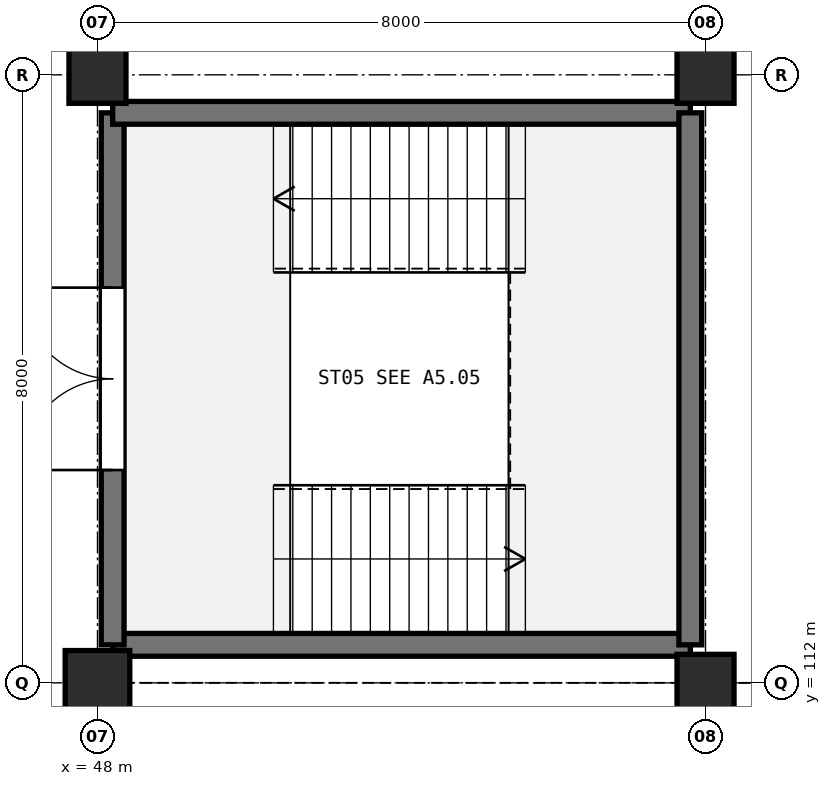
"""IFC4 building model, lengths in metres.
Left out: names, types, materials, properties, quantities, classifications, styles, units other than length and angle.
Written with IfcOpenShell. Run it as: python <this file> out.ifc"""

import sys

from ifc_helpers import new_model, si_unit, direction, frame, frame_2d, origin, origin_2d, place, context, subcontext, project, spatial, rectangle, extrude, element, fill, save


model = new_model("IFC4")
c1 = context("Model", 3, precision=1e-05, world=origin(), true_north=direction((0.0, 1.0)))
c2 = subcontext(c1, "Body", "Model", "MODEL_VIEW")
j1 = project(units=[si_unit("LENGTHUNIT", "METRE"), si_unit("PLANEANGLEUNIT", "RADIAN")], contexts=[c1])
p1 = place(None, origin())
s1 = spatial("IfcSite", under=j1, at=p1, CompositionType="ELEMENT")
p2 = place(p1, origin())
s2 = spatial("IfcBuilding", under=s1, at=p2, CompositionType="ELEMENT")
p3 = place(p2, frame((0.0, 0.0, -4.8)))
s3 = spatial("IfcBuildingStorey", under=s2, at=p3, CompositionType="ELEMENT", Elevation=-4.8)
p4 = place(p3, frame((48.0, 112.0, 0.0), z_axis=(0.0, 0.0, 1.0), x_axis=(1.0, 0.0, 0.0)))
e1 = element("IfcColumn", 1, at=p4, inside=s3, PredefinedType="COLUMN", context=c2, shape_type="SweptSolid", body=[
    extrude(rectangle(XDim=0.85, YDim=0.85, at=origin_2d()), origin(), (0.0, 0.0, 1.0), 4.8),
])
for number, where, z_axis, x_axis in (
    (2, (48.0, 120.0, 0.0), (0.0, 0.0, 1.0), (1.0, 0.0, 0.0)),
    (3, (56.0, 112.0, 0.0), (0.0, 0.0, 1.0), (1.0, 0.0, 0.0)),
    (4, (56.0, 120.0, 0.0), (0.0, 0.0, 1.0), (1.0, 0.0, 0.0)),
):
    element("IfcColumn", number, at=place(p3, frame(where, z_axis=z_axis, x_axis=x_axis)), inside=s3, PredefinedType="COLUMN", context=c2, shape_type="SweptSolid", body=[
        extrude(rectangle(XDim=0.75, YDim=0.75, at=origin_2d()), origin(), (0.0, 0.0, 1.0), 4.8),
    ])
p5 = place(p3, frame((55.8, 112.5, 0.0), z_axis=(0.0, 0.0, 1.0), x_axis=(-1.0, 0.0, 0.0)))
e5 = element("IfcWall", 5, at=p5, inside=s3, PredefinedType="SHEAR", context=c2, shape_type="SweptSolid", body=[
    extrude(rectangle(XDim=7.6, YDim=0.3, at=frame_2d((3.8, 0.0))), origin(), (0.0, 0.0, 1.0), 4.46),
])
p6 = place(p3, frame((48.2, 112.5, 0.0), z_axis=(0.0, 0.0, 1.0), x_axis=(0.0, 1.0, 0.0)))
e6 = element("IfcWall", 6, at=p6, inside=s3, PredefinedType="SHEAR", context=c2, shape_type="SweptSolid", body=[
    extrude(rectangle(XDim=7.0, YDim=0.3, at=frame_2d((3.5, 0.0))), origin(), (0.0, 0.0, 1.0), 4.46),
])
p7 = place(p6, frame((2.3, 0.0, 0.0)))
e7 = element("IfcOpeningElement", 7, at=p7, cuts=e6, PredefinedType="OPENING", context=c2, shape_type="SweptSolid", body=[
    extrude(rectangle(XDim=2.4, YDim=2.2, at=frame_2d((1.2, 1.1))), frame((0.0, 0.16, 0.0), z_axis=(0.0, -1.0, 0.0), x_axis=(1.0, 0.0, 0.0)), (0.0, 0.0, 1.0), 0.32),
])
p8 = place(p3, frame((48.2, 119.5, 0.0), z_axis=(0.0, 0.0, 1.0), x_axis=(1.0, 0.0, 0.0)))
e8 = element("IfcWall", 8, at=p8, inside=s3, PredefinedType="SHEAR", context=c2, shape_type="SweptSolid", body=[
    extrude(rectangle(XDim=7.6, YDim=0.3, at=frame_2d((3.8, 0.0))), origin(), (0.0, 0.0, 1.0), 4.46),
])
p9 = place(p3, frame((55.8, 119.5, 0.0), z_axis=(0.0, 0.0, 1.0), x_axis=(0.0, -1.0, 0.0)))
e9 = element("IfcWall", 9, at=p9, inside=s3, PredefinedType="SHEAR", context=c2, shape_type="SweptSolid", body=[
    extrude(rectangle(XDim=7.0, YDim=0.3, at=frame_2d((3.5, 0.0))), origin(), (0.0, 0.0, 1.0), 4.46),
])
p10 = place(p7, frame((2.4, 0.0, 0.0), z_axis=(0.0, 0.0, 1.0), x_axis=(-1.0, 0.0, 0.0)))
e10 = element("IfcDoor", 10, at=p10, inside=s3, OperationType="DOUBLE_DOOR_SINGLE_SWING", PredefinedType="DOOR", context=c2, shape_type="SweptSolid", body=[
    extrude(rectangle(XDim=2.4, YDim=2.2, at=frame_2d((1.2, 1.1))), frame((0.0, 0.025, 0.0), z_axis=(0.0, -1.0, 0.0), x_axis=(1.0, 0.0, 0.0)), (0.0, 0.0, 1.0), 0.05),
])
fill(e7, e10)
save(model, sys.argv[1])
